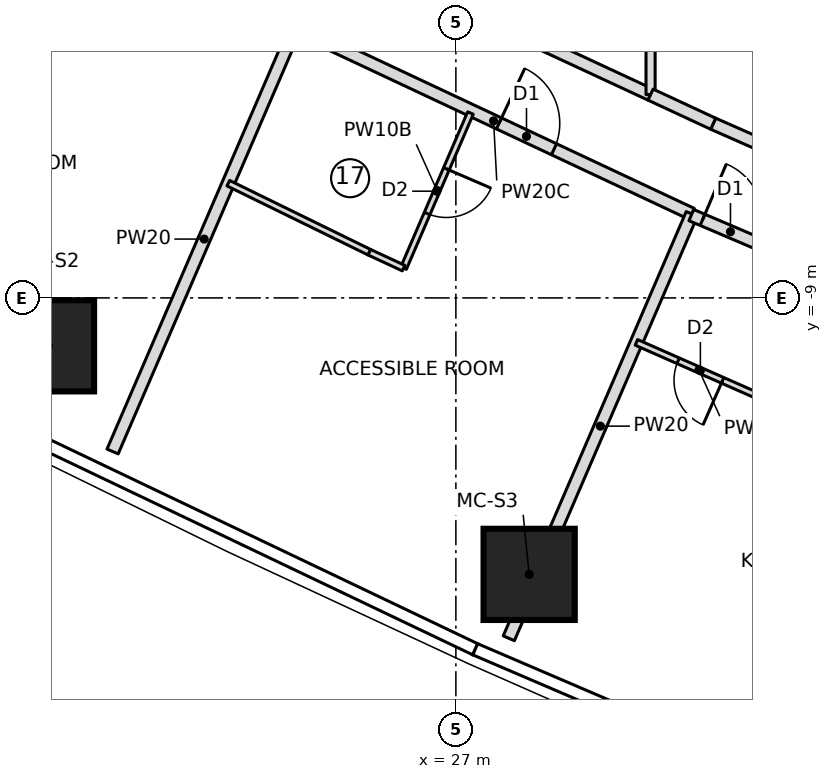
"""IFC4 building model, lengths in metres.
Left out: names, types, materials, properties, quantities, classifications, styles, units other than length and angle.
Written with IfcOpenShell. Run it as: python <this file> out.ifc"""

import sys

from ifc_helpers import new_model, si_unit, direction, frame, frame_2d, origin, origin_2d, place, context, subcontext, project, spatial, rectangle, extrude, element, fill, save


model = new_model("IFC4")
c1 = context("Model", 3, precision=1e-05, world=origin(), true_north=direction((0.0, 1.0)))
c2 = subcontext(c1, "Body", "Model", "MODEL_VIEW")
j1 = project(units=[si_unit("LENGTHUNIT", "METRE"), si_unit("PLANEANGLEUNIT", "RADIAN")], contexts=[c1])
p1 = place(None, origin())
s1 = spatial("IfcSite", under=j1, at=p1, CompositionType="ELEMENT")
p2 = place(p1, origin())
s2 = spatial("IfcBuilding", under=s1, at=p2, CompositionType="ELEMENT")
p3 = place(p2, frame((0.0, 0.0, 140.85)))
s3 = spatial("IfcBuildingStorey", under=s2, at=p3, CompositionType="ELEMENT", Elevation=140.85)
for number, where, z_axis, x_axis in (
    (1, (20.3, -9.788, 0.0), (0.0, 0.0, 1.0), (1.0, 0.0, 0.0)),
    (2, (28.205, -13.547, 0.0), (0.0, 0.0, 1.0), (1.0, 0.0, 0.0)),
):
    element("IfcColumn", number, at=place(p3, frame(where, z_axis=z_axis, x_axis=x_axis)), inside=s3, PredefinedType="COLUMN", context=c2, shape_type="SweptSolid", body=[
        extrude(rectangle(XDim=1.5, YDim=1.5, at=origin_2d()), origin(), (0.0, 0.0, 1.0), 3.55),
    ])
p4 = place(p3, frame((21.354, -11.526, 0.0), z_axis=(0.0, 0.0, 1.0), x_axis=(0.395982367396, 0.918258114427, 0.0)))
e3 = element("IfcWall", 3, at=p4, inside=s3, PredefinedType="PARTITIONING", context=c2, shape_type="SweptSolid", body=[
    extrude(rectangle(XDim=7.609, YDim=0.2, at=frame_2d((3.804, 0.0))), origin(), (0.0, 0.0, 1.0), 3.25),
])
p5 = place(p3, frame((24.36, -4.557, 0.0), z_axis=(0.0, 0.0, 1.0), x_axis=(0.905157912263, -0.425075468439, 0.0)))
e4 = element("IfcWall", 4, at=p5, inside=s3, PredefinedType="PARTITIONING", context=c2, shape_type="SweptSolid", body=[
    extrude(rectangle(XDim=7.203, YDim=0.2, at=frame_2d((3.602, 0.0))), origin(), (0.0, 0.0, 1.0), 3.25),
])
p6 = place(p5, frame((3.7, 0.0, 0.0)))
e5 = element("IfcOpeningElement", 5, at=p6, cuts=e4, PredefinedType="OPENING", context=c2, shape_type="SweptSolid", body=[
    extrude(rectangle(XDim=1.0, YDim=2.1, at=frame_2d((0.5, 1.05))), frame((0.0, 0.11, 0.0), z_axis=(0.0, -1.0, 0.0), x_axis=(1.0, 0.0, 0.0)), (0.0, 0.0, 1.0), 0.22),
])
p7 = place(p3, frame((27.24, -5.959, 0.0), z_axis=(0.0, 0.0, 1.0), x_axis=(-0.396018464604, -0.918242547311, 0.0)))
e6 = element("IfcWall", 6, at=p7, inside=s3, PredefinedType="PARTITIONING", context=c2, shape_type="SweptSolid", body=[
    extrude(rectangle(XDim=2.778, YDim=0.1, at=frame_2d((1.389, 0.0))), origin(), (0.0, 0.0, 1.0), 3.25),
])
p8 = place(p7, frame((1.0, 0.0, 0.0)))
e7 = element("IfcOpeningElement", 7, at=p8, cuts=e6, PredefinedType="OPENING", context=c2, shape_type="SweptSolid", body=[
    extrude(rectangle(XDim=0.8, YDim=2.1, at=frame_2d((0.4, 1.05))), frame((0.0, 0.06, 0.0), z_axis=(0.0, -1.0, 0.0), x_axis=(1.0, 0.0, 0.0)), (0.0, 0.0, 1.0), 0.12),
])
p9 = place(p3, frame((26.14, -8.51, 0.0), z_axis=(0.0, 0.0, 1.0), x_axis=(-0.906923333349, 0.421295700699, 0.0)))
e8 = element("IfcWall", 8, at=p9, inside=s3, PredefinedType="PARTITIONING", context=c2, shape_type="SweptSolid", body=[
    extrude(rectangle(XDim=0.622, YDim=0.1, at=frame_2d((0.311, 0.0))), origin(), (0.0, 0.0, 1.0), 3.25),
])
p10 = place(p3, frame((25.575, -8.248, 0.0), z_axis=(0.0, 0.0, 1.0), x_axis=(-0.89814200952, 0.439705504555, 0.0)))
e9 = element("IfcWall", 9, at=p10, inside=s3, PredefinedType="PARTITIONING", context=c2, shape_type="SweptSolid", body=[
    extrude(rectangle(XDim=2.581, YDim=0.1, at=frame_2d((1.291, 0.0))), origin(), (0.0, 0.0, 1.0), 3.25),
])
p11 = place(p3, frame((27.87, -14.598, 0.0), z_axis=(0.0, 0.0, 1.0), x_axis=(0.395976934703, 0.91826045716, 0.0)))
e10 = element("IfcWall", 10, at=p11, inside=s3, PredefinedType="PARTITIONING", context=c2, shape_type="SweptSolid", body=[
    extrude(rectangle(XDim=7.6, YDim=0.2, at=frame_2d((3.8, 0.0))), origin(), (0.0, 0.0, 1.0), 3.25),
])
p12 = place(p3, frame((30.872, -7.638, 0.0), z_axis=(0.0, 0.0, 1.0), x_axis=(0.919834621271, -0.392306346509, 0.0)))
e11 = element("IfcWall", 11, at=p12, inside=s3, PredefinedType="PARTITIONING", context=c2, shape_type="SweptSolid", body=[
    extrude(rectangle(XDim=7.2, YDim=0.2, at=frame_2d((3.6, 0.0))), origin(), (0.0, 0.0, 1.0), 3.25),
])
p13 = place(p12, frame((0.2, 0.0, 0.0)))
e12 = element("IfcOpeningElement", 12, at=p13, cuts=e11, PredefinedType="OPENING", context=c2, shape_type="SweptSolid", body=[
    extrude(rectangle(XDim=1.0, YDim=2.1, at=frame_2d((0.5, 1.05))), frame((0.0, 0.11, 0.0), z_axis=(0.0, -1.0, 0.0), x_axis=(1.0, 0.0, 0.0)), (0.0, 0.0, 1.0), 0.22),
])
p14 = place(p3, frame((32.028, -10.638, 0.0), z_axis=(0.0, 0.0, 1.0), x_axis=(-0.915118086658, 0.403185921719, 0.0)))
e13 = element("IfcWall", 13, at=p14, inside=s3, PredefinedType="PARTITIONING", context=c2, shape_type="SweptSolid", body=[
    extrude(rectangle(XDim=2.25, YDim=0.1, at=frame_2d((1.125, 0.0))), origin(), (0.0, 0.0, 1.0), 3.25),
])
p15 = place(p14, frame((0.7, 0.0, 0.0)))
e14 = element("IfcOpeningElement", 14, at=p15, cuts=e13, PredefinedType="OPENING", context=c2, shape_type="SweptSolid", body=[
    extrude(rectangle(XDim=0.8, YDim=2.1, at=frame_2d((0.4, 1.05))), frame((0.0, 0.06, 0.0), z_axis=(0.0, -1.0, 0.0), x_axis=(1.0, 0.0, 0.0)), (0.0, 0.0, 1.0), 0.12),
])
p16 = place(p3, frame((30.202, -5.656, 0.0), z_axis=(0.0, 0.0, 1.0), x_axis=(-0.906842391635, 0.42146990015, 0.0)))
e15 = element("IfcWall", 15, at=p16, inside=s3, PredefinedType="PARTITIONING", context=c2, shape_type="SweptSolid", body=[
    extrude(rectangle(XDim=3.06, YDim=0.2, at=frame_2d((1.53, 0.0))), origin(), (0.0, 0.0, 1.0), 3.25),
])
p17 = place(p3, frame((30.202, -5.656, 0.0), z_axis=(0.0, 0.0, 1.0), x_axis=(0.0, 1.0, 0.0)))
e16 = element("IfcWall", 16, at=p17, inside=s3, PredefinedType="PARTITIONING", context=c2, shape_type="SweptSolid", body=[
    extrude(rectangle(XDim=11.313, YDim=0.15, at=frame_2d((5.656, 0.0))), origin(), (0.0, 0.0, 1.0), 3.25),
])
p18 = place(p3, frame((33.308, -7.05, 0.0), z_axis=(0.0, 0.0, 1.0), x_axis=(-0.915102334452, 0.403221672881, 0.0)))
e17 = element("IfcWall", 17, at=p18, inside=s3, PredefinedType="PARTITIONING", context=c2, shape_type="SweptSolid", body=[
    extrude(rectangle(XDim=2.269, YDim=0.2, at=frame_2d((1.135, 0.0))), origin(), (0.0, 0.0, 1.0), 3.25),
])
p19 = place(p3, frame((31.231, -6.135, 0.0), z_axis=(0.0, 0.0, 1.0), x_axis=(-0.906797605575, 0.421566249271, 0.0)))
e18 = element("IfcWall", 18, at=p19, inside=s3, PredefinedType="PARTITIONING", context=c2, shape_type="SweptSolid", body=[
    extrude(rectangle(XDim=1.135, YDim=0.2, at=frame_2d((0.567, 0.0))), origin(), (0.0, 0.0, 1.0), 3.25),
])
p20 = place(p8, origin())
e19 = element("IfcDoor", 19, at=p20, inside=s3, OperationType="SINGLE_SWING_LEFT", PredefinedType="DOOR", context=c2, shape_type="SweptSolid", body=[
    extrude(rectangle(XDim=0.8, YDim=2.1, at=frame_2d((0.4, 1.05))), frame((0.0, 0.025, 0.0), z_axis=(0.0, -1.0, 0.0), x_axis=(1.0, 0.0, 0.0)), (0.0, 0.0, 1.0), 0.05),
])
fill(e7, e19)
p21 = place(p6, origin())
e20 = element("IfcDoor", 20, at=p21, inside=s3, OperationType="SINGLE_SWING_LEFT", PredefinedType="DOOR", context=c2, shape_type="SweptSolid", body=[
    extrude(rectangle(XDim=1.0, YDim=2.1, at=frame_2d((0.5, 1.05))), frame((0.0, 0.025, 0.0), z_axis=(0.0, -1.0, 0.0), x_axis=(1.0, 0.0, 0.0)), (0.0, 0.0, 1.0), 0.05),
])
fill(e5, e20)
p22 = place(p15, origin())
e21 = element("IfcDoor", 21, at=p22, inside=s3, OperationType="SINGLE_SWING_LEFT", PredefinedType="DOOR", context=c2, shape_type="SweptSolid", body=[
    extrude(rectangle(XDim=0.8, YDim=2.1, at=frame_2d((0.4, 1.05))), frame((0.0, 0.025, 0.0), z_axis=(0.0, -1.0, 0.0), x_axis=(1.0, 0.0, 0.0)), (0.0, 0.0, 1.0), 0.05),
])
fill(e14, e21)
p23 = place(p13, origin())
e22 = element("IfcDoor", 22, at=p23, inside=s3, OperationType="SINGLE_SWING_LEFT", PredefinedType="DOOR", context=c2, shape_type="SweptSolid", body=[
    extrude(rectangle(XDim=1.0, YDim=2.1, at=frame_2d((0.5, 1.05))), frame((0.0, 0.025, 0.0), z_axis=(0.0, -1.0, 0.0), x_axis=(1.0, 0.0, 0.0)), (0.0, 0.0, 1.0), 0.05),
])
fill(e12, e22)
save(model, sys.argv[1])
